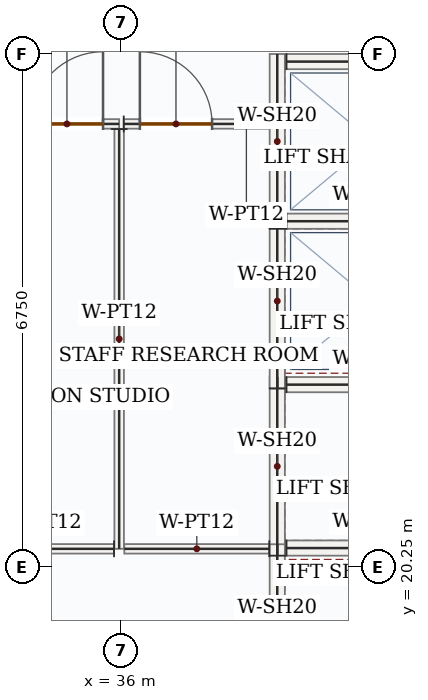
"""IFC4 building model, lengths in metres.
Left out: names, types, materials, properties, quantities, classifications, styles, units other than length and angle.
Written with IfcOpenShell. Run it as: python <this file> out.ifc"""

import sys

from ifc_helpers import new_model, si_unit, direction, frame, frame_2d, origin, place, context, subcontext, project, spatial, rectangle, extrude, source, transform, mapped, element, fill, save


model = new_model("IFC4")
c1 = context("Model", 3, precision=1e-05, world=origin(), true_north=direction((0.0, 1.0)))
c2 = subcontext(c1, "Body", "Model", "MODEL_VIEW")
j1 = project(units=[si_unit("LENGTHUNIT", "METRE"), si_unit("PLANEANGLEUNIT", "RADIAN")], contexts=[c1])
p1 = place(None, origin())
s1 = spatial("IfcSite", under=j1, at=p1, CompositionType="ELEMENT")
p2 = place(p1, origin())
s2 = spatial("IfcBuilding", under=s1, at=p2, CompositionType="ELEMENT")
p3 = place(p2, frame((0.0, 0.0, 41.7)))
s3 = spatial("IfcBuildingStorey", under=s2, at=p3, CompositionType="ELEMENT", Elevation=41.7)
m1 = source(origin(), c2, "Body", "SweptSolid", [
    extrude(rectangle(XDim=2.35, YDim=0.2, at=frame_2d((1.175, 0.0))), origin(), (0.0, 0.0, 1.0), 3.95),
])
p4 = place(p3, frame((38.05, 20.4, 0.0), z_axis=(0.0, 0.0, 1.0), x_axis=(0.0, 1.0, 0.0)))
e1 = element("IfcWall", 1, at=p4, inside=s3, PredefinedType="SOLIDWALL", context=c2, shape_type="MappedRepresentation", body=[
    mapped(m1, transform((0.0, 0.0, 0.0), x_axis=(1.0, 0.0, 0.0), y_axis=(0.0, 1.0, 0.0), z_axis=(0.0, 0.0, 1.0), scale=1.0)),
])
m2 = source(origin(), c2, "Body", "SweptSolid", [
    extrude(rectangle(XDim=2.26, YDim=0.2, at=frame_2d((1.13, 0.0))), origin(), (0.0, 0.0, 1.0), 3.95),
])
for number, where, z_axis, x_axis in (
    (2, (38.17, 20.5, 0.0), (0.0, 0.0, 1.0), (1.0, 0.0, 0.0)),
    (3, (38.17, 22.65, 0.0), (0.0, 0.0, 1.0), (1.0, 0.0, 0.0)),
):
    element("IfcWall", number, at=place(p3, frame(where, z_axis=z_axis, x_axis=x_axis)), inside=s3, PredefinedType="SOLIDWALL", context=c2, shape_type="MappedRepresentation", body=[
        mapped(m2, transform((0.0, 0.0, 0.0), x_axis=(1.0, 0.0, 0.0), y_axis=(0.0, 1.0, 0.0), z_axis=(0.0, 0.0, 1.0), scale=1.0)),
    ])
p5 = place(p3, frame((38.05, 18.2, 0.0), z_axis=(0.0, 0.0, 1.0), x_axis=(0.0, 1.0, 0.0)))
e4 = element("IfcWall", 4, at=p5, inside=s3, PredefinedType="SOLIDWALL", context=c2, shape_type="MappedRepresentation", body=[
    mapped(m1, transform((0.0, 0.0, 0.0), x_axis=(1.0, 0.0, 0.0), y_axis=(0.0, 1.0, 0.0), z_axis=(0.0, 0.0, 1.0), scale=1.0)),
])
m3 = source(origin(), c2, "Body", "SweptSolid", [
    extrude(rectangle(XDim=2.3, YDim=0.2, at=frame_2d((1.15, 0.0))), origin(), (0.0, 0.0, 1.0), 3.95),
])
p6 = place(p3, frame((38.05, 24.7, 0.0), z_axis=(0.0, 0.0, 1.0), x_axis=(0.0, 1.0, 0.0)))
e5 = element("IfcWall", 5, at=p6, inside=s3, PredefinedType="SOLIDWALL", context=c2, shape_type="MappedRepresentation", body=[
    mapped(m3, transform((0.0, 0.0, 0.0), x_axis=(1.0, 0.0, 0.0), y_axis=(0.0, 1.0, 0.0), z_axis=(0.0, 0.0, 1.0), scale=1.0)),
])
for number, where, z_axis, x_axis in (
    (6, (38.17, 24.8, 0.0), (0.0, 0.0, 1.0), (1.0, 0.0, 0.0)),
    (7, (38.17, 26.9, 0.0), (0.0, 0.0, 1.0), (1.0, 0.0, 0.0)),
):
    element("IfcWall", number, at=place(p3, frame(where, z_axis=z_axis, x_axis=x_axis)), inside=s3, PredefinedType="SOLIDWALL", context=c2, shape_type="MappedRepresentation", body=[
        mapped(m2, transform((0.0, 0.0, 0.0), x_axis=(1.0, 0.0, 0.0), y_axis=(0.0, 1.0, 0.0), z_axis=(0.0, 0.0, 1.0), scale=1.0)),
    ])
m4 = source(origin(), c2, "Body", "SweptSolid", [
    extrude(rectangle(XDim=2.3, YDim=0.2, at=frame_2d((1.15, 0.0))), origin(), (0.0, 0.0, 1.0), 3.95),
])
p7 = place(p3, frame((38.05, 22.6, 0.0), z_axis=(0.0, 0.0, 1.0), x_axis=(0.0, 1.0, 0.0)))
e8 = element("IfcWall", 8, at=p7, inside=s3, PredefinedType="SOLIDWALL", context=c2, shape_type="MappedRepresentation", body=[
    mapped(m4, transform((0.0, 0.0, 0.0), x_axis=(1.0, 0.0, 0.0), y_axis=(0.0, 1.0, 0.0), z_axis=(0.0, 0.0, 1.0), scale=1.0)),
])
p8 = place(p3, frame((34.055, 26.08, 0.0), z_axis=(0.0, 0.0, 1.0), x_axis=(1.0, 0.0, 0.0)))
e9 = element("IfcWall", 9, at=p8, inside=s3, PredefinedType="PARTITIONING", context=c2, shape_type="SweptSolid", body=[
    extrude(rectangle(XDim=1.915, YDim=0.125, at=frame_2d((0.958, 0.0))), origin(), (0.0, 0.0, 1.0), 3.95),
])
p9 = place(p8, frame((0.753, 0.0, 0.0)))
e10 = element("IfcOpeningElement", 10, at=p9, cuts=e9, PredefinedType="OPENING", context=c2, shape_type="SweptSolid", body=[
    extrude(rectangle(XDim=0.95, YDim=2.15, at=frame_2d((0.475, 1.075))), frame((0.0, 0.073, 0.0), z_axis=(0.0, -1.0, 0.0), x_axis=(1.0, 0.0, 0.0)), (0.0, 0.0, 1.0), 0.145),
])
m5 = source(origin(), c2, "Body", "SweptSolid", [
    extrude(rectangle(XDim=5.522, YDim=0.125, at=frame_2d((2.761, 0.0))), origin(), (0.0, 0.0, 1.0), 3.95),
])
p10 = place(p3, frame((35.97, 26.012, 0.0), z_axis=(0.0, 0.0, 1.0), x_axis=(0.0, -1.0, 0.0)))
e11 = element("IfcWall", 11, at=p10, inside=s3, PredefinedType="PARTITIONING", context=c2, shape_type="MappedRepresentation", body=[
    mapped(m5, transform((0.0, 0.0, 0.0), x_axis=(1.0, 0.0, 0.0), y_axis=(0.0, 1.0, 0.0), z_axis=(0.0, 0.0, 1.0), scale=1.0)),
])
m6 = source(origin(), c2, "Body", "SweptSolid", [
    extrude(rectangle(XDim=1.848, YDim=0.125, at=frame_2d((0.924, 0.0))), origin(), (0.0, 0.0, 1.0), 3.95),
])
p11 = place(p3, frame((35.903, 20.49, 0.0), z_axis=(0.0, 0.0, 1.0), x_axis=(-1.0, 0.0, 0.0)))
e12 = element("IfcWall", 12, at=p11, inside=s3, PredefinedType="PARTITIONING", context=c2, shape_type="MappedRepresentation", body=[
    mapped(m6, transform((0.0, 0.0, 0.0), x_axis=(1.0, 0.0, 0.0), y_axis=(0.0, 1.0, 0.0), z_axis=(0.0, 0.0, 1.0), scale=1.0)),
])
p12 = place(p3, frame((36.03, 26.08, 0.0), z_axis=(0.0, 0.0, 1.0), x_axis=(1.0, 0.0, 0.0)))
e13 = element("IfcWall", 13, at=p12, inside=s3, PredefinedType="PARTITIONING", context=c2, shape_type="SweptSolid", body=[
    extrude(rectangle(XDim=1.915, YDim=0.125, at=frame_2d((0.958, 0.0))), origin(), (0.0, 0.0, 1.0), 3.95),
])
p13 = place(p12, frame((0.212, 0.0, 0.0)))
e14 = element("IfcOpeningElement", 14, at=p13, cuts=e13, PredefinedType="OPENING", context=c2, shape_type="SweptSolid", body=[
    extrude(rectangle(XDim=0.95, YDim=2.15, at=frame_2d((0.475, 1.075))), frame((0.0, 0.073, 0.0), z_axis=(0.0, -1.0, 0.0), x_axis=(1.0, 0.0, 0.0)), (0.0, 0.0, 1.0), 0.145),
])
m7 = source(origin(), c2, "Body", "SweptSolid", [
    extrude(rectangle(XDim=1.907, YDim=0.125, at=frame_2d((0.954, 0.0))), origin(), (0.0, 0.0, 1.0), 3.95),
])
p14 = place(p3, frame((37.945, 20.49, 0.0), z_axis=(0.0, 0.0, 1.0), x_axis=(-1.0, 0.0, 0.0)))
e15 = element("IfcWall", 15, at=p14, inside=s3, PredefinedType="PARTITIONING", context=c2, shape_type="MappedRepresentation", body=[
    mapped(m7, transform((0.0, 0.0, 0.0), x_axis=(1.0, 0.0, 0.0), y_axis=(0.0, 1.0, 0.0), z_axis=(0.0, 0.0, 1.0), scale=1.0)),
])
m8 = source(origin(), c2, "Body", "SweptSolid", [
    extrude(rectangle(XDim=0.95, YDim=2.15, at=frame_2d((0.475, 1.075))), frame((0.0, 0.025, 0.0), z_axis=(0.0, -1.0, 0.0), x_axis=(1.0, 0.0, 0.0)), (0.0, 0.0, 1.0), 0.05),
])
p15 = place(p9, origin())
e16 = element("IfcDoor", 16, at=p15, inside=s3, OperationType="SINGLE_SWING_RIGHT", PredefinedType="DOOR", context=c2, shape_type="MappedRepresentation", body=[
    mapped(m8, transform((0.0, 0.0, 0.0), x_axis=(1.0, 0.0, 0.0), y_axis=(0.0, 1.0, 0.0), z_axis=(0.0, 0.0, 1.0), scale=1.0)),
])
fill(e10, e16)
p16 = place(p13, origin())
e17 = element("IfcDoor", 17, at=p16, inside=s3, OperationType="SINGLE_SWING_LEFT", PredefinedType="DOOR", context=c2, shape_type="MappedRepresentation", body=[
    mapped(m8, transform((0.0, 0.0, 0.0), x_axis=(1.0, 0.0, 0.0), y_axis=(0.0, 1.0, 0.0), z_axis=(0.0, 0.0, 1.0), scale=1.0)),
])
fill(e14, e17)
save(model, sys.argv[1])
